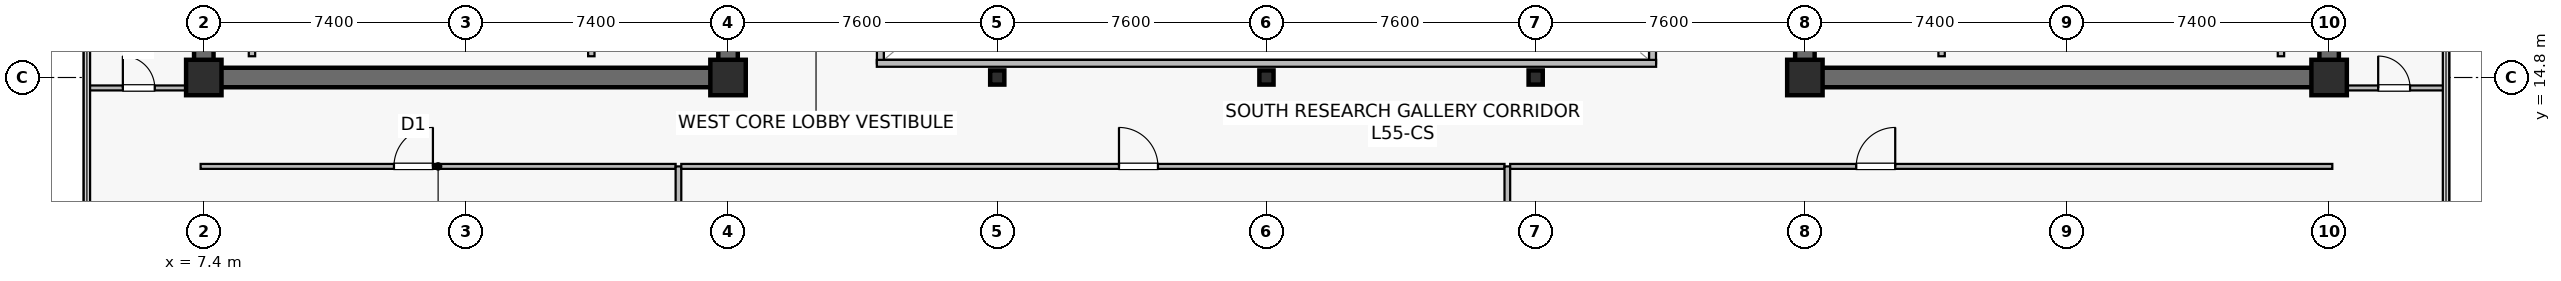
"""IFC4 building model, lengths in metres.
Left out: names, types, materials, properties, quantities, classifications, styles, units other than length and angle.
Written with IfcOpenShell. Run it as: python <this file> out.ifc"""

import sys

from ifc_helpers import new_model, si_unit, direction, frame, frame_2d, origin, origin_2d, place, context, subcontext, project, spatial, rectangle, hollow_rectangle, extrude, source, transform, mapped, element, fill, save


model = new_model("IFC4")
c1 = context("Model", 3, precision=1e-05, world=origin(), true_north=direction((0.0, 1.0)))
c2 = subcontext(c1, "Body", "Model", "MODEL_VIEW")
j1 = project(units=[si_unit("LENGTHUNIT", "METRE"), si_unit("PLANEANGLEUNIT", "RADIAN")], contexts=[c1])
p1 = place(None, origin())
s1 = spatial("IfcSite", under=j1, at=p1, CompositionType="ELEMENT")
p2 = place(p1, origin())
s2 = spatial("IfcBuilding", under=s1, at=p2, CompositionType="ELEMENT")
p3 = place(p2, frame((0.0, 0.0, 230.1)))
s3 = spatial("IfcBuildingStorey", under=s2, at=p3, CompositionType="ELEMENT", Elevation=230.1)
p4 = place(p3, frame((7.125, 14.8, 0.0), z_axis=(0.0, 0.0, 1.0), x_axis=(1.0, 0.0, 0.0)))
e1 = element("IfcWall", 1, at=p4, inside=s3, PredefinedType="SHEAR", context=c2, shape_type="SweptSolid", body=[
    extrude(rectangle(XDim=15.35, YDim=0.55, at=frame_2d((7.675, 0.0))), origin(), (0.0, 0.0, 1.0), 3.8),
])
p5 = place(p3, frame((7.4, 15.075, 0.0), z_axis=(0.0, 0.0, 1.0), x_axis=(0.0, 1.0, 0.0)))
e2 = element("IfcWall", 2, at=p5, inside=s3, PredefinedType="SHEAR", context=c2, shape_type="SweptSolid", body=[
    extrude(rectangle(XDim=18.45, YDim=0.55, at=frame_2d((9.225, 0.0))), origin(), (0.0, 0.0, 1.0), 3.8),
])
p6 = place(p3, frame((22.2, 15.075, 0.0), z_axis=(0.0, 0.0, 1.0), x_axis=(0.0, 1.0, 0.0)))
e3 = element("IfcWall", 3, at=p6, inside=s3, PredefinedType="SHEAR", context=c2, shape_type="SweptSolid", body=[
    extrude(rectangle(XDim=18.45, YDim=0.55, at=frame_2d((9.225, 0.0))), origin(), (0.0, 0.0, 1.0), 3.8),
])
p7 = place(p6, frame((3.475, 0.0, 0.0)))
e4 = element("IfcOpeningElement", 4, at=p7, cuts=e3, PredefinedType="OPENING", context=c2, shape_type="SweptSolid", body=[
    extrude(rectangle(XDim=1.42, YDim=2.2, at=frame_2d((0.71, 1.1))), frame((0.0, 0.285, 0.0), z_axis=(0.0, -1.0, 0.0), x_axis=(1.0, 0.0, 0.0)), (0.0, 0.0, 1.0), 0.57),
])
p8 = place(p3, frame((52.325, 14.8, 0.0), z_axis=(0.0, 0.0, 1.0), x_axis=(1.0, 0.0, 0.0)))
e5 = element("IfcWall", 5, at=p8, inside=s3, PredefinedType="SHEAR", context=c2, shape_type="SweptSolid", body=[
    extrude(rectangle(XDim=15.35, YDim=0.55, at=frame_2d((7.675, 0.0))), origin(), (0.0, 0.0, 1.0), 3.8),
])
p9 = place(p3, frame((52.6, 15.075, 0.0), z_axis=(0.0, 0.0, 1.0), x_axis=(0.0, 1.0, 0.0)))
e6 = element("IfcWall", 6, at=p9, inside=s3, PredefinedType="SHEAR", context=c2, shape_type="SweptSolid", body=[
    extrude(rectangle(XDim=18.45, YDim=0.55, at=frame_2d((9.225, 0.0))), origin(), (0.0, 0.0, 1.0), 3.8),
])
p10 = place(p9, frame((3.475, 0.0, 0.0)))
e7 = element("IfcOpeningElement", 7, at=p10, cuts=e6, PredefinedType="OPENING", context=c2, shape_type="SweptSolid", body=[
    extrude(rectangle(XDim=1.42, YDim=2.2, at=frame_2d((0.71, 1.1))), frame((0.0, 0.285, 0.0), z_axis=(0.0, -1.0, 0.0), x_axis=(1.0, 0.0, 0.0)), (0.0, 0.0, 1.0), 0.57),
])
p11 = place(p3, frame((67.4, 15.075, 0.0), z_axis=(0.0, 0.0, 1.0), x_axis=(0.0, 1.0, 0.0)))
e8 = element("IfcWall", 8, at=p11, inside=s3, PredefinedType="SHEAR", context=c2, shape_type="SweptSolid", body=[
    extrude(rectangle(XDim=18.45, YDim=0.55, at=frame_2d((9.225, 0.0))), origin(), (0.0, 0.0, 1.0), 3.8),
])
m1 = source(origin(), c2, "Body", "SweptSolid", [
    extrude(rectangle(XDim=1.0, YDim=1.0, at=origin_2d()), origin(), (0.0, 0.0, 1.0), 4.1),
])
for number, where, z_axis, x_axis in (
    (9, (7.4, 14.8, 0.0), (0.0, 0.0, 1.0), (1.0, 0.0, 0.0)),
    (10, (22.2, 14.8, 0.0), (0.0, 0.0, 1.0), (1.0, 0.0, 0.0)),
    (11, (52.6, 14.8, 0.0), (0.0, 0.0, 1.0), (1.0, 0.0, 0.0)),
    (12, (67.4, 14.8, 0.0), (0.0, 0.0, 1.0), (1.0, 0.0, 0.0)),
):
    element("IfcColumn", number, at=place(p3, frame(where, z_axis=z_axis, x_axis=x_axis)), inside=s3, PredefinedType="COLUMN", context=c2, shape_type="MappedRepresentation", body=[
        mapped(m1, transform((0.0, 0.0, 0.0), scale=1.0)),
    ])
m2 = source(origin(), c2, "Body", "SweptSolid", [
    extrude(hollow_rectangle(XDim=0.4, YDim=0.4, WallThickness=0.019, at=origin_2d()), origin(), (0.0, 0.0, 1.0), 4.1),
])
for number, where, z_axis, x_axis in (
    (13, (29.8, 14.8, 0.0), (0.0, 0.0, 1.0), (1.0, 0.0, 0.0)),
    (14, (37.4, 14.8, 0.0), (0.0, 0.0, 1.0), (1.0, 0.0, 0.0)),
    (15, (45.0, 14.8, 0.0), (0.0, 0.0, 1.0), (1.0, 0.0, 0.0)),
):
    element("IfcColumn", number, at=place(p3, frame(where, z_axis=z_axis, x_axis=x_axis)), inside=s3, PredefinedType="COLUMN", context=c2, shape_type="MappedRepresentation", body=[
        mapped(m2, transform((0.0, 0.0, 0.0), scale=1.0)),
    ])
for number, where, z_axis, x_axis in (
    (16, (18.34, 15.4, 0.0), (0.0, 0.0, 1.0), (0.0, 1.0, 0.0)),
    (17, (8.76, 15.4, 0.0), (0.0, 0.0, 1.0), (0.0, 1.0, 0.0)),
    (18, (56.46, 15.4, 0.0), (0.0, 0.0, 1.0), (0.0, 1.0, 0.0)),
    (19, (66.04, 15.4, 0.0), (0.0, 0.0, 1.0), (0.0, 1.0, 0.0)),
):
    element("IfcWall", number, at=place(p3, frame(where, z_axis=z_axis, x_axis=x_axis)), inside=s3, PredefinedType="SOLIDWALL", context=c2, shape_type="SweptSolid", body=[
        extrude(rectangle(XDim=2.4, YDim=0.18, at=frame_2d((1.2, 0.0))), origin(), (0.0, 0.0, 1.0), 3.8),
    ])
p12 = place(p3, frame((26.5, 15.2, 0.0), z_axis=(0.0, 0.0, 1.0), x_axis=(0.0, 1.0, 0.0)))
e20 = element("IfcWall", 20, at=p12, inside=s3, PredefinedType="SOLIDWALL", context=c2, shape_type="SweptSolid", body=[
    extrude(rectangle(XDim=18.2, YDim=0.195, at=frame_2d((9.1, 0.0))), origin(), (0.0, 0.0, 1.0), 3.8),
])
p13 = place(p12, frame((1.8, 0.0, 0.9)))
e21 = element("IfcOpeningElement", 21, at=p13, cuts=e20, PredefinedType="OPENING", context=c2, shape_type="SweptSolid", body=[
    extrude(rectangle(XDim=1.2, YDim=1.35, at=frame_2d((0.6, 0.675))), frame((0.0, 0.107, 0.0), z_axis=(0.0, -1.0, 0.0), x_axis=(1.0, 0.0, 0.0)), (0.0, 0.0, 1.0), 0.215),
])
p14 = place(p12, frame((13.2, 0.0, 0.9)))
e22 = element("IfcOpeningElement", 22, at=p14, cuts=e20, PredefinedType="OPENING", context=c2, shape_type="SweptSolid", body=[
    extrude(rectangle(XDim=1.2, YDim=1.35, at=frame_2d((0.6, 0.675))), frame((0.0, 0.107, 0.0), z_axis=(0.0, -1.0, 0.0), x_axis=(1.0, 0.0, 0.0)), (0.0, 0.0, 1.0), 0.215),
])
p15 = place(p3, frame((48.3, 15.2, 0.0), z_axis=(0.0, 0.0, 1.0), x_axis=(0.0, 1.0, 0.0)))
e23 = element("IfcWall", 23, at=p15, inside=s3, PredefinedType="SOLIDWALL", context=c2, shape_type="SweptSolid", body=[
    extrude(rectangle(XDim=18.2, YDim=0.195, at=frame_2d((9.1, 0.0))), origin(), (0.0, 0.0, 1.0), 3.8),
])
p16 = place(p15, frame((1.8, 0.0, 0.9)))
e24 = element("IfcOpeningElement", 24, at=p16, cuts=e23, PredefinedType="OPENING", context=c2, shape_type="SweptSolid", body=[
    extrude(rectangle(XDim=1.2, YDim=1.35, at=frame_2d((0.6, 0.675))), frame((0.0, 0.107, 0.0), z_axis=(0.0, -1.0, 0.0), x_axis=(1.0, 0.0, 0.0)), (0.0, 0.0, 1.0), 0.215),
])
p17 = place(p15, frame((13.2, 0.0, 0.9)))
e25 = element("IfcOpeningElement", 25, at=p17, cuts=e23, PredefinedType="OPENING", context=c2, shape_type="SweptSolid", body=[
    extrude(rectangle(XDim=1.2, YDim=1.35, at=frame_2d((0.6, 0.675))), frame((0.0, 0.107, 0.0), z_axis=(0.0, -1.0, 0.0), x_axis=(1.0, 0.0, 0.0)), (0.0, 0.0, 1.0), 0.215),
])
p18 = place(p3, frame((26.4, 15.2, 0.0), z_axis=(0.0, 0.0, 1.0), x_axis=(1.0, 0.0, 0.0)))
e26 = element("IfcWall", 26, at=p18, inside=s3, PredefinedType="SOLIDWALL", context=c2, shape_type="SweptSolid", body=[
    extrude(rectangle(XDim=22.0, YDim=0.195, at=frame_2d((11.0, 0.0))), origin(), (0.0, 0.0, 1.0), 3.8),
])
p19 = place(p3, frame((7.31, 12.29, 0.0), z_axis=(0.0, 0.0, 1.0), x_axis=(1.0, 0.0, 0.0)))
e27 = element("IfcWall", 27, at=p19, inside=s3, PredefinedType="PARTITIONING", context=c2, shape_type="SweptSolid", body=[
    extrude(rectangle(XDim=13.41, YDim=0.14, at=frame_2d((6.705, 0.0))), origin(), (0.0, 0.0, 1.0), 3.197),
])
p20 = place(p19, frame((5.458, 0.0, 0.0)))
e28 = element("IfcOpeningElement", 28, at=p20, cuts=e27, PredefinedType="OPENING", context=c2, shape_type="SweptSolid", body=[
    extrude(rectangle(XDim=1.1, YDim=2.18, at=frame_2d((0.55, 1.09))), frame((0.0, 0.08, 0.0), z_axis=(0.0, -1.0, 0.0), x_axis=(1.0, 0.0, 0.0)), (0.0, 0.0, 1.0), 0.16),
])
p21 = place(p3, frame((20.8, 2.71, 0.0), z_axis=(0.0, 0.0, 1.0), x_axis=(0.0, 1.0, 0.0)))
e29 = element("IfcWall", 29, at=p21, inside=s3, PredefinedType="PARTITIONING", context=c2, shape_type="SweptSolid", body=[
    extrude(rectangle(XDim=9.58, YDim=0.16, at=frame_2d((4.79, 0.0))), origin(), (0.0, 0.0, 1.0), 3.135),
])
p22 = place(p3, frame((20.88, 12.29, 0.0), z_axis=(0.0, 0.0, 1.0), x_axis=(1.0, 0.0, 0.0)))
e30 = element("IfcWall", 30, at=p22, inside=s3, PredefinedType="PARTITIONING", context=c2, shape_type="SweptSolid", body=[
    extrude(rectangle(XDim=23.24, YDim=0.14, at=frame_2d((11.62, 0.0))), origin(), (0.0, 0.0, 1.0), 3.197),
])
p23 = place(p22, frame((12.356, 0.0, 0.0)))
e31 = element("IfcOpeningElement", 31, at=p23, cuts=e30, PredefinedType="OPENING", context=c2, shape_type="SweptSolid", body=[
    extrude(rectangle(XDim=1.1, YDim=2.18, at=frame_2d((0.55, 1.09))), frame((0.0, 0.08, 0.0), z_axis=(0.0, -1.0, 0.0), x_axis=(1.0, 0.0, 0.0)), (0.0, 0.0, 1.0), 0.16),
])
p24 = place(p3, frame((44.2, 3.91, 0.0), z_axis=(0.0, 0.0, 1.0), x_axis=(0.0, 1.0, 0.0)))
e32 = element("IfcWall", 32, at=p24, inside=s3, PredefinedType="PARTITIONING", context=c2, shape_type="SweptSolid", body=[
    extrude(rectangle(XDim=8.38, YDim=0.16, at=frame_2d((4.19, 0.0))), origin(), (0.0, 0.0, 1.0), 3.135),
])
p25 = place(p3, frame((44.28, 12.29, 0.0), z_axis=(0.0, 0.0, 1.0), x_axis=(1.0, 0.0, 0.0)))
e33 = element("IfcWall", 33, at=p25, inside=s3, PredefinedType="PARTITIONING", context=c2, shape_type="SweptSolid", body=[
    extrude(rectangle(XDim=23.21, YDim=0.14, at=frame_2d((11.605, 0.0))), origin(), (0.0, 0.0, 1.0), 3.197),
])
p26 = place(p25, frame((9.771, 0.0, 0.0)))
e34 = element("IfcOpeningElement", 34, at=p26, cuts=e33, PredefinedType="OPENING", context=c2, shape_type="SweptSolid", body=[
    extrude(rectangle(XDim=1.1, YDim=2.18, at=frame_2d((0.55, 1.09))), frame((0.0, 0.08, 0.0), z_axis=(0.0, -1.0, 0.0), x_axis=(1.0, 0.0, 0.0)), (0.0, 0.0, 1.0), 0.16),
])
p27 = place(p3, frame((4.11, 14.505, 0.0), z_axis=(0.0, 0.0, 1.0), x_axis=(1.0, 0.0, 0.0)))
e35 = element("IfcWall", 35, at=p27, inside=s3, PredefinedType="PARTITIONING", context=c2, shape_type="SweptSolid", body=[
    extrude(rectangle(XDim=2.91, YDim=0.14, at=frame_2d((1.455, 0.0))), origin(), (0.0, 0.0, 1.0), 3.8),
])
p28 = place(p27, frame((1.005, 0.0, 0.0)))
e36 = element("IfcOpeningElement", 36, at=p28, cuts=e35, PredefinedType="OPENING", context=c2, shape_type="SweptSolid", body=[
    extrude(rectangle(XDim=0.9, YDim=2.1, at=frame_2d((0.45, 1.05))), frame((0.0, 0.08, 0.0), z_axis=(0.0, -1.0, 0.0), x_axis=(1.0, 0.0, 0.0)), (0.0, 0.0, 1.0), 0.16),
])
p29 = place(p3, frame((67.78, 14.505, 0.0), z_axis=(0.0, 0.0, 1.0), x_axis=(1.0, 0.0, 0.0)))
e37 = element("IfcWall", 37, at=p29, inside=s3, PredefinedType="PARTITIONING", context=c2, shape_type="SweptSolid", body=[
    extrude(rectangle(XDim=2.91, YDim=0.14, at=frame_2d((1.455, 0.0))), origin(), (0.0, 0.0, 1.0), 3.8),
])
p30 = place(p29, frame((1.005, 0.0, 0.0)))
e38 = element("IfcOpeningElement", 38, at=p30, cuts=e37, PredefinedType="OPENING", context=c2, shape_type="SweptSolid", body=[
    extrude(rectangle(XDim=0.9, YDim=2.1, at=frame_2d((0.45, 1.05))), frame((0.0, 0.08, 0.0), z_axis=(0.0, -1.0, 0.0), x_axis=(1.0, 0.0, 0.0)), (0.0, 0.0, 1.0), 0.16),
])
m3 = source(origin(), c2, "Body", "SweptSolid", [
    extrude(rectangle(XDim=1.1, YDim=2.18, at=frame_2d((0.55, 1.09))), frame((0.0, 0.025, 0.0), z_axis=(0.0, -1.0, 0.0), x_axis=(1.0, 0.0, 0.0)), (0.0, 0.0, 1.0), 0.05),
])
p31 = place(p20, origin())
e39 = element("IfcDoor", 39, at=p31, inside=s3, OperationType="SINGLE_SWING_RIGHT", PredefinedType="DOOR", context=c2, shape_type="MappedRepresentation", body=[
    mapped(m3, transform((0.0, 0.0, 0.0), scale=1.0)),
])
fill(e28, e39)
p32 = place(p23, origin())
e40 = element("IfcDoor", 40, at=p32, inside=s3, OperationType="SINGLE_SWING_LEFT", PredefinedType="DOOR", context=c2, shape_type="MappedRepresentation", body=[
    mapped(m3, transform((0.0, 0.0, 0.0), scale=1.0)),
])
fill(e31, e40)
p33 = place(p26, origin())
e41 = element("IfcDoor", 41, at=p33, inside=s3, OperationType="SINGLE_SWING_RIGHT", PredefinedType="DOOR", context=c2, shape_type="MappedRepresentation", body=[
    mapped(m3, transform((0.0, 0.0, 0.0), scale=1.0)),
])
fill(e34, e41)
m4 = source(origin(), c2, "Body", "SweptSolid", [
    extrude(rectangle(XDim=0.9, YDim=2.1, at=frame_2d((0.45, 1.05))), frame((0.0, 0.025, 0.0), z_axis=(0.0, -1.0, 0.0), x_axis=(1.0, 0.0, 0.0)), (0.0, 0.0, 1.0), 0.05),
])
p34 = place(p28, origin())
e42 = element("IfcDoor", 42, at=p34, inside=s3, OperationType="SINGLE_SWING_LEFT", PredefinedType="DOOR", context=c2, shape_type="MappedRepresentation", body=[
    mapped(m4, transform((0.0, 0.0, 0.0), scale=1.0)),
])
fill(e36, e42)
p35 = place(p30, origin())
e43 = element("IfcDoor", 43, at=p35, inside=s3, OperationType="SINGLE_SWING_LEFT", PredefinedType="DOOR", context=c2, shape_type="MappedRepresentation", body=[
    mapped(m4, transform((0.0, 0.0, 0.0), scale=1.0)),
])
fill(e38, e43)
save(model, sys.argv[1])
